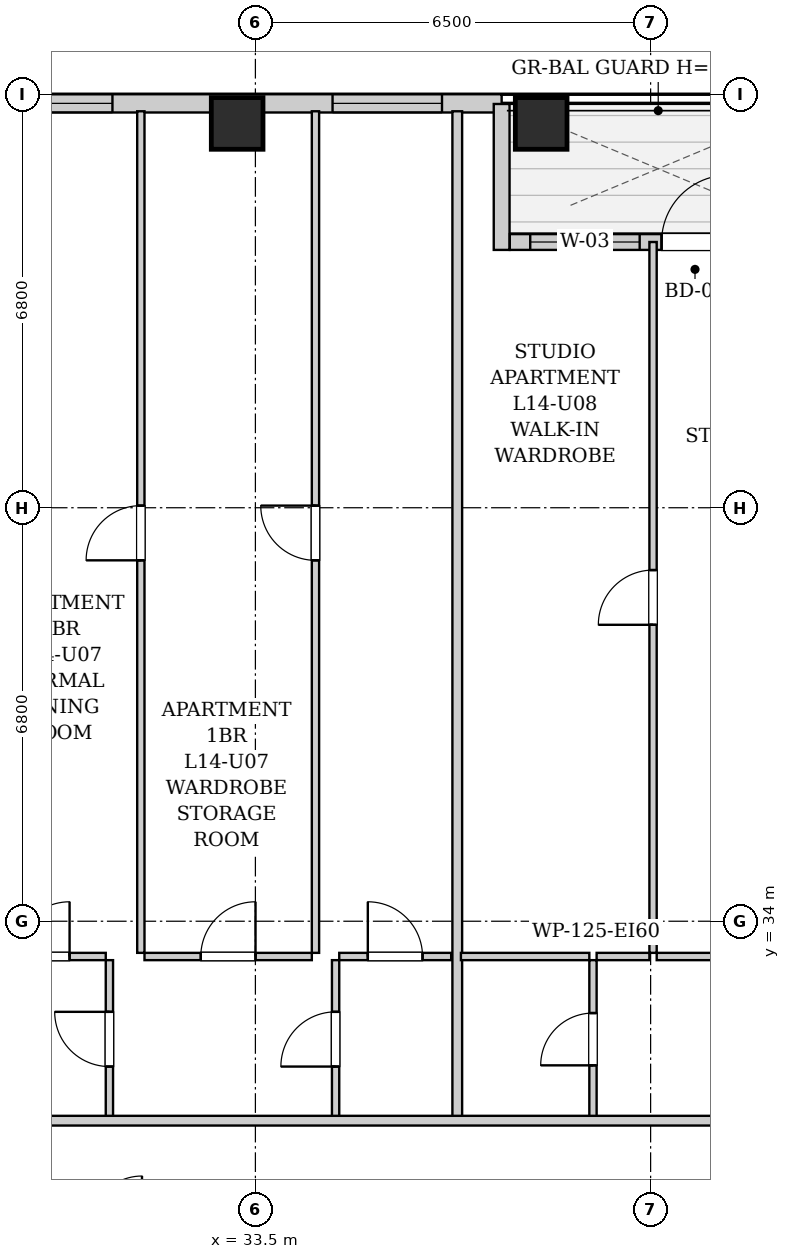
"""IFC4 building model, lengths in metres.
Left out: names, types, materials, properties, quantities, classifications, styles, units other than length and angle.
Written with IfcOpenShell. Run it as: python <this file> out.ifc"""

import sys

from ifc_helpers import new_model, si_unit, direction, frame, frame_2d, origin, origin_2d, place, context, subcontext, project, spatial, rectangle, extrude, element, fill, save


model = new_model("IFC4")
c1 = context("Model", 3, precision=1e-05, world=origin(), true_north=direction((0.0, 1.0)))
c2 = subcontext(c1, "Body", "Model", "MODEL_VIEW")
j1 = project(units=[si_unit("LENGTHUNIT", "METRE"), si_unit("PLANEANGLEUNIT", "RADIAN")], contexts=[c1])
p1 = place(None, origin())
s1 = spatial("IfcSite", under=j1, at=p1, CompositionType="ELEMENT")
p2 = place(p1, origin())
s2 = spatial("IfcBuilding", under=s1, at=p2, CompositionType="ELEMENT")
p3 = place(p2, frame((0.0, 0.0, 54.6)))
s3 = spatial("IfcBuildingStorey", under=s2, at=p3, CompositionType="ELEMENT", Elevation=54.6)
for number, where, z_axis, x_axis in (
    (1, (33.2, 47.12, 0.0), (0.0, 0.0, 1.0), (1.0, 0.0, 0.0)),
    (2, (38.2, 47.12, 0.0), (0.0, 0.0, 1.0), (1.0, 0.0, 0.0)),
):
    element("IfcColumn", number, at=place(p3, frame(where, z_axis=z_axis, x_axis=x_axis)), inside=s3, PredefinedType="COLUMN", context=c2, shape_type="SweptSolid", body=[
        extrude(rectangle(XDim=0.85, YDim=0.85, at=origin_2d()), origin(), (0.0, 0.0, 1.0), 3.2),
    ])
p4 = place(p3, frame((10.0, 47.45, 0.0), z_axis=(0.0, 0.0, 1.0), x_axis=(1.0, 0.0, 0.0)))
e3 = element("IfcWall", 3, at=p4, inside=s3, PredefinedType="SOLIDWALL", context=c2, shape_type="SweptSolid", body=[
    extrude(rectangle(XDim=27.55, YDim=0.3, at=frame_2d((13.775, 0.0))), origin(), (0.0, 0.0, 1.0), 1.975),
])
p5 = place(p4, frame((1.735, 0.0, 0.55)))
e4 = element("IfcOpeningElement", 4, at=p5, cuts=e3, PredefinedType="OPENING", context=c2, shape_type="SweptSolid", body=[
    extrude(rectangle(XDim=1.8, YDim=1.2, at=frame_2d((0.9, 0.6))), frame((0.0, 0.16, 0.0), z_axis=(0.0, -1.0, 0.0), x_axis=(1.0, 0.0, 0.0)), (0.0, 0.0, 1.0), 0.32),
])
p6 = place(p4, frame((5.415, 0.0, 0.55)))
e5 = element("IfcOpeningElement", 5, at=p6, cuts=e3, PredefinedType="OPENING", context=c2, shape_type="SweptSolid", body=[
    extrude(rectangle(XDim=1.8, YDim=1.2, at=frame_2d((0.9, 0.6))), frame((0.0, 0.16, 0.0), z_axis=(0.0, -1.0, 0.0), x_axis=(1.0, 0.0, 0.0)), (0.0, 0.0, 1.0), 0.32),
])
p7 = place(p4, frame((10.617, 0.0, 0.55)))
e6 = element("IfcOpeningElement", 6, at=p7, cuts=e3, PredefinedType="OPENING", context=c2, shape_type="SweptSolid", body=[
    extrude(rectangle(XDim=1.8, YDim=1.2, at=frame_2d((0.9, 0.6))), frame((0.0, 0.16, 0.0), z_axis=(0.0, -1.0, 0.0), x_axis=(1.0, 0.0, 0.0)), (0.0, 0.0, 1.0), 0.32),
])
p8 = place(p4, frame((17.5, 0.0, 0.55)))
e7 = element("IfcOpeningElement", 7, at=p8, cuts=e3, PredefinedType="OPENING", context=c2, shape_type="SweptSolid", body=[
    extrude(rectangle(XDim=0.85, YDim=1.2, at=frame_2d((0.425, 0.6))), frame((0.0, 0.16, 0.0), z_axis=(0.0, -1.0, 0.0), x_axis=(1.0, 0.0, 0.0)), (0.0, 0.0, 1.0), 0.32),
])
p9 = place(p4, frame((19.349, 0.0, 0.55)))
e8 = element("IfcOpeningElement", 8, at=p9, cuts=e3, PredefinedType="OPENING", context=c2, shape_type="SweptSolid", body=[
    extrude(rectangle(XDim=1.8, YDim=1.2, at=frame_2d((0.9, 0.6))), frame((0.0, 0.16, 0.0), z_axis=(0.0, -1.0, 0.0), x_axis=(1.0, 0.0, 0.0)), (0.0, 0.0, 1.0), 0.32),
])
p10 = place(p4, frame((24.769, 0.0, 0.55)))
e9 = element("IfcOpeningElement", 9, at=p10, cuts=e3, PredefinedType="OPENING", context=c2, shape_type="SweptSolid", body=[
    extrude(rectangle(XDim=1.8, YDim=1.2, at=frame_2d((0.9, 0.6))), frame((0.0, 0.16, 0.0), z_axis=(0.0, -1.0, 0.0), x_axis=(1.0, 0.0, 0.0)), (0.0, 0.0, 1.0), 0.32),
])
p11 = place(p3, frame((37.55, 47.44, 0.0), z_axis=(0.0, 0.0, 1.0), x_axis=(0.0, -1.0, 0.0)))
e10 = element("IfcWall", 10, at=p11, inside=s3, PredefinedType="SOLIDWALL", context=c2, shape_type="SweptSolid", body=[
    extrude(rectangle(XDim=2.4, YDim=0.26, at=frame_2d((1.2, 0.0))), origin(), (0.0, 0.0, 1.0), 2.94),
])
p12 = place(p3, frame((37.684, 45.17, 0.0), z_axis=(0.0, 0.0, 1.0), x_axis=(1.0, 0.0, 0.0)))
e11 = element("IfcWall", 11, at=p12, inside=s3, PredefinedType="SOLIDWALL", context=c2, shape_type="SweptSolid", body=[
    extrude(rectangle(XDim=4.882, YDim=0.26, at=frame_2d((2.441, 0.0))), origin(), (0.0, 0.0, 1.0), 2.94),
])
p13 = place(p12, frame((2.496, 0.0, 0.0)))
e12 = element("IfcOpeningElement", 12, at=p13, cuts=e11, PredefinedType="OPENING", context=c2, shape_type="SweptSolid", body=[
    extrude(rectangle(XDim=1.1, YDim=2.0, at=frame_2d((0.55, 1.0))), frame((0.0, 0.14, 0.0), z_axis=(0.0, -1.0, 0.0), x_axis=(1.0, 0.0, 0.0)), (0.0, 0.0, 1.0), 0.28),
])
p14 = place(p12, frame((0.336, 0.0, 0.85)))
e13 = element("IfcOpeningElement", 13, at=p14, cuts=e11, PredefinedType="OPENING", context=c2, shape_type="SweptSolid", body=[
    extrude(rectangle(XDim=1.8, YDim=1.65, at=frame_2d((0.9, 0.825))), frame((0.0, 0.14, 0.0), z_axis=(0.0, -1.0, 0.0), x_axis=(1.0, 0.0, 0.0)), (0.0, 0.0, 1.0), 0.28),
])
p15 = place(p3, frame((31.099, 30.76, 0.0), z_axis=(0.0, 0.0, 1.0), x_axis=(0.0, 1.0, 0.0)))
e14 = element("IfcWall", 14, at=p15, inside=s3, PredefinedType="PARTITIONING", context=c2, shape_type="SweptSolid", body=[
    extrude(rectangle(XDim=2.6, YDim=0.12, at=frame_2d((1.3, 0.0))), origin(), (0.0, 0.0, 1.0), 2.94),
])
p16 = place(p15, frame((0.85, 0.0, 0.0)))
e15 = element("IfcOpeningElement", 15, at=p16, cuts=e14, PredefinedType="OPENING", context=c2, shape_type="SweptSolid", body=[
    extrude(rectangle(XDim=0.9, YDim=2.05, at=frame_2d((0.45, 1.025))), frame((0.0, 0.07, 0.0), z_axis=(0.0, -1.0, 0.0), x_axis=(1.0, 0.0, 0.0)), (0.0, 0.0, 1.0), 0.14),
])
p17 = place(p3, frame((28.949, 33.42, 0.0), z_axis=(0.0, 0.0, 1.0), x_axis=(1.0, 0.0, 0.0)))
e16 = element("IfcWall", 16, at=p17, inside=s3, PredefinedType="PARTITIONING", context=c2, shape_type="SweptSolid", body=[
    extrude(rectangle(XDim=2.09, YDim=0.12, at=frame_2d((1.045, 0.0))), origin(), (0.0, 0.0, 1.0), 2.94),
])
p18 = place(p17, frame((0.595, 0.0, 0.0)))
e17 = element("IfcOpeningElement", 17, at=p18, cuts=e16, PredefinedType="OPENING", context=c2, shape_type="SweptSolid", body=[
    extrude(rectangle(XDim=0.9, YDim=2.05, at=frame_2d((0.45, 1.025))), frame((0.0, 0.07, 0.0), z_axis=(0.0, -1.0, 0.0), x_axis=(1.0, 0.0, 0.0)), (0.0, 0.0, 1.0), 0.14),
])
p19 = place(p3, frame((34.819, 30.76, 0.0), z_axis=(0.0, 0.0, 1.0), x_axis=(0.0, 1.0, 0.0)))
e18 = element("IfcWall", 18, at=p19, inside=s3, PredefinedType="PARTITIONING", context=c2, shape_type="SweptSolid", body=[
    extrude(rectangle(XDim=2.6, YDim=0.12, at=frame_2d((1.3, 0.0))), origin(), (0.0, 0.0, 1.0), 2.94),
])
p20 = place(p19, frame((0.85, 0.0, 0.0)))
e19 = element("IfcOpeningElement", 19, at=p20, cuts=e18, PredefinedType="OPENING", context=c2, shape_type="SweptSolid", body=[
    extrude(rectangle(XDim=0.9, YDim=2.05, at=frame_2d((0.45, 1.025))), frame((0.0, 0.07, 0.0), z_axis=(0.0, -1.0, 0.0), x_axis=(1.0, 0.0, 0.0)), (0.0, 0.0, 1.0), 0.14),
])
p21 = place(p3, frame((31.676, 33.42, 0.0), z_axis=(0.0, 0.0, 1.0), x_axis=(1.0, 0.0, 0.0)))
e20 = element("IfcWall", 20, at=p21, inside=s3, PredefinedType="PARTITIONING", context=c2, shape_type="SweptSolid", body=[
    extrude(rectangle(XDim=2.752, YDim=0.12, at=frame_2d((1.376, 0.0))), origin(), (0.0, 0.0, 1.0), 2.94),
])
p22 = place(p21, frame((0.926, 0.0, 0.0)))
e21 = element("IfcOpeningElement", 21, at=p22, cuts=e20, PredefinedType="OPENING", context=c2, shape_type="SweptSolid", body=[
    extrude(rectangle(XDim=0.9, YDim=2.05, at=frame_2d((0.45, 1.025))), frame((0.0, 0.07, 0.0), z_axis=(0.0, -1.0, 0.0), x_axis=(1.0, 0.0, 0.0)), (0.0, 0.0, 1.0), 0.14),
])
p23 = place(p3, frame((34.879, 33.42, 0.0), z_axis=(0.0, 0.0, 1.0), x_axis=(1.0, 0.0, 0.0)))
e22 = element("IfcWall", 22, at=p23, inside=s3, PredefinedType="PARTITIONING", context=c2, shape_type="SweptSolid", body=[
    extrude(rectangle(XDim=1.841, YDim=0.12, at=frame_2d((0.92, 0.0))), origin(), (0.0, 0.0, 1.0), 2.94),
])
p24 = place(p23, frame((0.47, 0.0, 0.0)))
e23 = element("IfcOpeningElement", 23, at=p24, cuts=e22, PredefinedType="OPENING", context=c2, shape_type="SweptSolid", body=[
    extrude(rectangle(XDim=0.9, YDim=2.05, at=frame_2d((0.45, 1.025))), frame((0.0, 0.07, 0.0), z_axis=(0.0, -1.0, 0.0), x_axis=(1.0, 0.0, 0.0)), (0.0, 0.0, 1.0), 0.14),
])
p25 = place(p3, frame((31.616, 33.48, 0.0), z_axis=(0.0, 0.0, 1.0), x_axis=(0.0, 1.0, 0.0)))
e24 = element("IfcWall", 24, at=p25, inside=s3, PredefinedType="PARTITIONING", context=c2, shape_type="SweptSolid", body=[
    extrude(rectangle(XDim=13.84, YDim=0.12, at=frame_2d((6.92, 0.0))), origin(), (0.0, 0.0, 1.0), 2.94),
])
p26 = place(p25, frame((6.455, 0.0, 0.0)))
e25 = element("IfcOpeningElement", 25, at=p26, cuts=e24, PredefinedType="OPENING", context=c2, shape_type="SweptSolid", body=[
    extrude(rectangle(XDim=0.9, YDim=2.05, at=frame_2d((0.45, 1.025))), frame((0.0, 0.07, 0.0), z_axis=(0.0, -1.0, 0.0), x_axis=(1.0, 0.0, 0.0)), (0.0, 0.0, 1.0), 0.14),
])
p27 = place(p3, frame((34.488, 33.48, 0.0), z_axis=(0.0, 0.0, 1.0), x_axis=(0.0, 1.0, 0.0)))
e26 = element("IfcWall", 26, at=p27, inside=s3, PredefinedType="PARTITIONING", context=c2, shape_type="SweptSolid", body=[
    extrude(rectangle(XDim=13.84, YDim=0.12, at=frame_2d((6.92, 0.0))), origin(), (0.0, 0.0, 1.0), 2.94),
])
p28 = place(p27, frame((6.455, 0.0, 0.0)))
e27 = element("IfcOpeningElement", 27, at=p28, cuts=e26, PredefinedType="OPENING", context=c2, shape_type="SweptSolid", body=[
    extrude(rectangle(XDim=0.9, YDim=2.05, at=frame_2d((0.45, 1.025))), frame((0.0, 0.07, 0.0), z_axis=(0.0, -1.0, 0.0), x_axis=(1.0, 0.0, 0.0)), (0.0, 0.0, 1.0), 0.14),
])
p29 = place(p3, frame((36.82, 30.76, 0.0), z_axis=(0.0, 0.0, 1.0), x_axis=(0.0, 1.0, 0.0)))
e28 = element("IfcWall", 28, at=p29, inside=s3, PredefinedType="PARTITIONING", context=c2, shape_type="SweptSolid", body=[
    extrude(rectangle(XDim=16.56, YDim=0.16, at=frame_2d((8.28, 0.0))), origin(), (0.0, 0.0, 1.0), 2.94),
])
p30 = place(p3, frame((39.052, 30.76, 0.0), z_axis=(0.0, 0.0, 1.0), x_axis=(0.0, 1.0, 0.0)))
e29 = element("IfcWall", 29, at=p30, inside=s3, PredefinedType="PARTITIONING", context=c2, shape_type="SweptSolid", body=[
    extrude(rectangle(XDim=2.6, YDim=0.12, at=frame_2d((1.3, 0.0))), origin(), (0.0, 0.0, 1.0), 2.94),
])
p31 = place(p30, frame((0.87, 0.0, 0.0)))
e30 = element("IfcOpeningElement", 30, at=p31, cuts=e29, PredefinedType="OPENING", context=c2, shape_type="SweptSolid", body=[
    extrude(rectangle(XDim=0.86, YDim=2.05, at=frame_2d((0.43, 1.025))), frame((0.0, 0.07, 0.0), z_axis=(0.0, -1.0, 0.0), x_axis=(1.0, 0.0, 0.0)), (0.0, 0.0, 1.0), 0.14),
])
p32 = place(p3, frame((36.88, 33.42, 0.0), z_axis=(0.0, 0.0, 1.0), x_axis=(1.0, 0.0, 0.0)))
e31 = element("IfcWall", 31, at=p32, inside=s3, PredefinedType="PARTITIONING", context=c2, shape_type="SweptSolid", body=[
    extrude(rectangle(XDim=2.112, YDim=0.12, at=frame_2d((1.056, 0.0))), origin(), (0.0, 0.0, 1.0), 2.94),
])
p33 = place(p3, frame((39.112, 33.42, 0.0), z_axis=(0.0, 0.0, 1.0), x_axis=(1.0, 0.0, 0.0)))
e32 = element("IfcWall", 32, at=p33, inside=s3, PredefinedType="PARTITIONING", context=c2, shape_type="SweptSolid", body=[
    extrude(rectangle(XDim=0.868, YDim=0.12, at=frame_2d((0.434, 0.0))), origin(), (0.0, 0.0, 1.0), 2.94),
])
p34 = place(p3, frame((40.1, 33.42, 0.0), z_axis=(0.0, 0.0, 1.0), x_axis=(1.0, 0.0, 0.0)))
e33 = element("IfcWall", 33, at=p34, inside=s3, PredefinedType="PARTITIONING", context=c2, shape_type="SweptSolid", body=[
    extrude(rectangle(XDim=3.82, YDim=0.12, at=frame_2d((1.91, 0.0))), origin(), (0.0, 0.0, 1.0), 2.94),
])
p35 = place(p34, frame((1.46, 0.0, 0.0)))
e34 = element("IfcOpeningElement", 34, at=p35, cuts=e33, PredefinedType="OPENING", context=c2, shape_type="SweptSolid", body=[
    extrude(rectangle(XDim=0.9, YDim=2.05, at=frame_2d((0.45, 1.025))), frame((0.0, 0.07, 0.0), z_axis=(0.0, -1.0, 0.0), x_axis=(1.0, 0.0, 0.0)), (0.0, 0.0, 1.0), 0.14),
])
p36 = place(p3, frame((40.04, 33.48, 0.0), z_axis=(0.0, 0.0, 1.0), x_axis=(0.0, 1.0, 0.0)))
e35 = element("IfcWall", 35, at=p36, inside=s3, PredefinedType="PARTITIONING", context=c2, shape_type="SweptSolid", body=[
    extrude(rectangle(XDim=11.69, YDim=0.12, at=frame_2d((5.845, 0.0))), origin(), (0.0, 0.0, 1.0), 2.94),
])
p37 = place(p36, frame((5.395, 0.0, 0.0)))
e36 = element("IfcOpeningElement", 36, at=p37, cuts=e35, PredefinedType="OPENING", context=c2, shape_type="SweptSolid", body=[
    extrude(rectangle(XDim=0.9, YDim=2.05, at=frame_2d((0.45, 1.025))), frame((0.0, 0.07, 0.0), z_axis=(0.0, -1.0, 0.0), x_axis=(1.0, 0.0, 0.0)), (0.0, 0.0, 1.0), 0.14),
])
p38 = place(p3, frame((10.05, 30.72, 0.0), z_axis=(0.0, 0.0, 1.0), x_axis=(1.0, 0.0, 0.0)))
e37 = element("IfcWall", 37, at=p38, inside=s3, PredefinedType="PARTITIONING", context=c2, shape_type="SweptSolid", body=[
    extrude(rectangle(XDim=33.9, YDim=0.16, at=frame_2d((16.95, 0.0))), origin(), (0.0, 0.0, 1.0), 2.94),
])
p39 = place(p38, frame((3.8, 0.0, 0.0)))
e38 = element("IfcOpeningElement", 38, at=p39, cuts=e37, PredefinedType="OPENING", context=c2, shape_type="SweptSolid", body=[
    extrude(rectangle(XDim=0.95, YDim=2.1, at=frame_2d((0.475, 1.05))), frame((0.0, 0.09, 0.0), z_axis=(0.0, -1.0, 0.0), x_axis=(1.0, 0.0, 0.0)), (0.0, 0.0, 1.0), 0.18),
])
p40 = place(p38, frame((11.977, 0.0, 0.0)))
e39 = element("IfcOpeningElement", 39, at=p40, cuts=e37, PredefinedType="OPENING", context=c2, shape_type="SweptSolid", body=[
    extrude(rectangle(XDim=0.95, YDim=2.1, at=frame_2d((0.475, 1.05))), frame((0.0, 0.09, 0.0), z_axis=(0.0, -1.0, 0.0), x_axis=(1.0, 0.0, 0.0)), (0.0, 0.0, 1.0), 0.18),
])
p41 = place(p38, frame((18.09, 0.0, 0.0)))
e40 = element("IfcOpeningElement", 40, at=p41, cuts=e37, PredefinedType="OPENING", context=c2, shape_type="SweptSolid", body=[
    extrude(rectangle(XDim=0.95, YDim=2.1, at=frame_2d((0.475, 1.05))), frame((0.0, 0.09, 0.0), z_axis=(0.0, -1.0, 0.0), x_axis=(1.0, 0.0, 0.0)), (0.0, 0.0, 1.0), 0.18),
])
p42 = place(p38, frame((30.956, 0.0, 0.0)))
e41 = element("IfcOpeningElement", 41, at=p42, cuts=e37, PredefinedType="OPENING", context=c2, shape_type="SweptSolid", body=[
    extrude(rectangle(XDim=0.95, YDim=2.1, at=frame_2d((0.475, 1.05))), frame((0.0, 0.09, 0.0), z_axis=(0.0, -1.0, 0.0), x_axis=(1.0, 0.0, 0.0)), (0.0, 0.0, 1.0), 0.18),
])
p43 = place(p16, origin())
e42 = element("IfcDoor", 42, at=p43, inside=s3, OperationType="SINGLE_SWING_RIGHT", PredefinedType="DOOR", context=c2, shape_type="SweptSolid", body=[
    extrude(rectangle(XDim=0.9, YDim=2.05, at=frame_2d((0.45, 1.025))), frame((0.0, 0.025, 0.0), z_axis=(0.0, -1.0, 0.0), x_axis=(1.0, 0.0, 0.0)), (0.0, 0.0, 1.0), 0.05),
])
fill(e15, e42)
p44 = place(p18, origin())
e43 = element("IfcDoor", 43, at=p44, inside=s3, OperationType="SINGLE_SWING_RIGHT", PredefinedType="DOOR", context=c2, shape_type="SweptSolid", body=[
    extrude(rectangle(XDim=0.9, YDim=2.05, at=frame_2d((0.45, 1.025))), frame((0.0, 0.025, 0.0), z_axis=(0.0, -1.0, 0.0), x_axis=(1.0, 0.0, 0.0)), (0.0, 0.0, 1.0), 0.05),
])
fill(e17, e43)
p45 = place(p20, origin())
e44 = element("IfcDoor", 44, at=p45, inside=s3, OperationType="SINGLE_SWING_LEFT", PredefinedType="DOOR", context=c2, shape_type="SweptSolid", body=[
    extrude(rectangle(XDim=0.9, YDim=2.05, at=frame_2d((0.45, 1.025))), frame((0.0, 0.025, 0.0), z_axis=(0.0, -1.0, 0.0), x_axis=(1.0, 0.0, 0.0)), (0.0, 0.0, 1.0), 0.05),
])
fill(e19, e44)
p46 = place(p22, origin())
e45 = element("IfcDoor", 45, at=p46, inside=s3, OperationType="SINGLE_SWING_RIGHT", PredefinedType="DOOR", context=c2, shape_type="SweptSolid", body=[
    extrude(rectangle(XDim=0.9, YDim=2.05, at=frame_2d((0.45, 1.025))), frame((0.0, 0.025, 0.0), z_axis=(0.0, -1.0, 0.0), x_axis=(1.0, 0.0, 0.0)), (0.0, 0.0, 1.0), 0.05),
])
fill(e21, e45)
p47 = place(p24, origin())
e46 = element("IfcDoor", 46, at=p47, inside=s3, OperationType="SINGLE_SWING_LEFT", PredefinedType="DOOR", context=c2, shape_type="SweptSolid", body=[
    extrude(rectangle(XDim=0.9, YDim=2.05, at=frame_2d((0.45, 1.025))), frame((0.0, 0.025, 0.0), z_axis=(0.0, -1.0, 0.0), x_axis=(1.0, 0.0, 0.0)), (0.0, 0.0, 1.0), 0.05),
])
fill(e23, e46)
p48 = place(p26, origin())
e47 = element("IfcDoor", 47, at=p48, inside=s3, OperationType="SINGLE_SWING_LEFT", PredefinedType="DOOR", context=c2, shape_type="SweptSolid", body=[
    extrude(rectangle(XDim=0.9, YDim=2.05, at=frame_2d((0.45, 1.025))), frame((0.0, 0.025, 0.0), z_axis=(0.0, -1.0, 0.0), x_axis=(1.0, 0.0, 0.0)), (0.0, 0.0, 1.0), 0.05),
])
fill(e25, e47)
p49 = place(p28, origin())
e48 = element("IfcDoor", 48, at=p49, inside=s3, OperationType="SINGLE_SWING_RIGHT", PredefinedType="DOOR", context=c2, shape_type="SweptSolid", body=[
    extrude(rectangle(XDim=0.9, YDim=2.05, at=frame_2d((0.45, 1.025))), frame((0.0, 0.025, 0.0), z_axis=(0.0, -1.0, 0.0), x_axis=(1.0, 0.0, 0.0)), (0.0, 0.0, 1.0), 0.05),
])
fill(e27, e48)
p50 = place(p31, origin())
e49 = element("IfcDoor", 49, at=p50, inside=s3, OperationType="SINGLE_SWING_LEFT", PredefinedType="DOOR", context=c2, shape_type="SweptSolid", body=[
    extrude(rectangle(XDim=0.86, YDim=2.05, at=frame_2d((0.43, 1.025))), frame((0.0, 0.025, 0.0), z_axis=(0.0, -1.0, 0.0), x_axis=(1.0, 0.0, 0.0)), (0.0, 0.0, 1.0), 0.05),
])
fill(e30, e49)
p51 = place(p37, origin())
e50 = element("IfcDoor", 50, at=p51, inside=s3, OperationType="SINGLE_SWING_LEFT", PredefinedType="DOOR", context=c2, shape_type="SweptSolid", body=[
    extrude(rectangle(XDim=0.9, YDim=2.05, at=frame_2d((0.45, 1.025))), frame((0.0, 0.025, 0.0), z_axis=(0.0, -1.0, 0.0), x_axis=(1.0, 0.0, 0.0)), (0.0, 0.0, 1.0), 0.05),
])
fill(e36, e50)
p52 = place(p13, origin())
e51 = element("IfcDoor", 51, at=p52, inside=s3, OperationType="SINGLE_SWING_RIGHT", PredefinedType="DOOR", context=c2, shape_type="SweptSolid", body=[
    extrude(rectangle(XDim=1.1, YDim=2.0, at=frame_2d((0.55, 1.0))), frame((0.0, 0.025, 0.0), z_axis=(0.0, -1.0, 0.0), x_axis=(1.0, 0.0, 0.0)), (0.0, 0.0, 1.0), 0.05),
])
fill(e12, e51)
p53 = place(p9, origin())
e52 = element("IfcWindow", 52, at=p53, inside=s3, PartitioningType="DOUBLE_PANEL_VERTICAL", PredefinedType="WINDOW", context=c2, shape_type="SweptSolid", body=[
    extrude(rectangle(XDim=1.8, YDim=1.2, at=frame_2d((0.9, 0.6))), frame((0.0, 0.03, 0.0), z_axis=(0.0, -1.0, 0.0), x_axis=(1.0, 0.0, 0.0)), (0.0, 0.0, 1.0), 0.06),
])
fill(e8, e52)
p54 = place(p10, origin())
e53 = element("IfcWindow", 53, at=p54, inside=s3, PartitioningType="DOUBLE_PANEL_VERTICAL", PredefinedType="WINDOW", context=c2, shape_type="SweptSolid", body=[
    extrude(rectangle(XDim=1.8, YDim=1.2, at=frame_2d((0.9, 0.6))), frame((0.0, 0.03, 0.0), z_axis=(0.0, -1.0, 0.0), x_axis=(1.0, 0.0, 0.0)), (0.0, 0.0, 1.0), 0.06),
])
fill(e9, e53)
p55 = place(p14, origin())
e54 = element("IfcWindow", 54, at=p55, inside=s3, PartitioningType="DOUBLE_PANEL_VERTICAL", PredefinedType="WINDOW", context=c2, shape_type="SweptSolid", body=[
    extrude(rectangle(XDim=1.8, YDim=1.65, at=frame_2d((0.9, 0.825))), frame((0.0, 0.03, 0.0), z_axis=(0.0, -1.0, 0.0), x_axis=(1.0, 0.0, 0.0)), (0.0, 0.0, 1.0), 0.06),
])
fill(e13, e54)
save(model, sys.argv[1])
